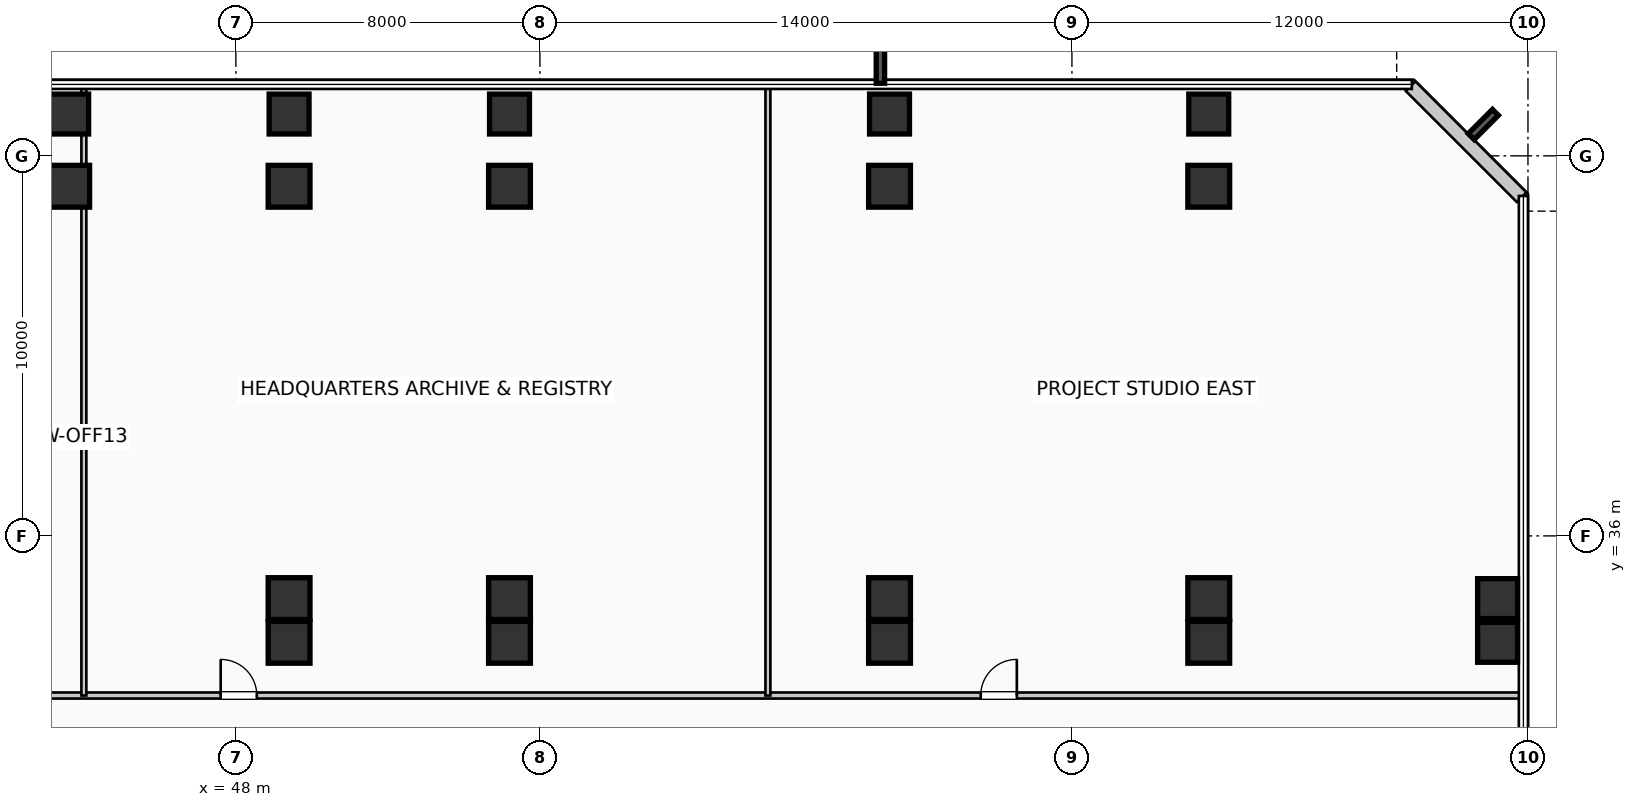
"""IFC4 building model, lengths in metres.
Left out: names, types, materials, properties, quantities, classifications, styles, units other than length and angle.
Written with IfcOpenShell. Run it as: python <this file> out.ifc"""

import sys

from ifc_helpers import new_model, si_unit, direction, frame, frame_2d, origin, origin_2d, place, context, subcontext, project, spatial, rectangle, extrude, element, fill, save


model = new_model("IFC4")
c1 = context("Model", 3, precision=1e-05, world=origin(), true_north=direction((0.0, 1.0)))
c2 = subcontext(c1, "Body", "Model", "MODEL_VIEW")
j1 = project(units=[si_unit("LENGTHUNIT", "METRE"), si_unit("PLANEANGLEUNIT", "RADIAN")], contexts=[c1])
p1 = place(None, origin())
s1 = spatial("IfcSite", under=j1, at=p1, CompositionType="ELEMENT")
p2 = place(p1, origin())
s2 = spatial("IfcBuilding", under=s1, at=p2, CompositionType="ELEMENT")
p3 = place(p2, frame((0.0, 0.0, 5.94)))
s3 = spatial("IfcBuildingStorey", under=s2, at=p3, CompositionType="ELEMENT", Elevation=5.94)
p4 = place(p3, frame((43.6, 45.2, 0.0), z_axis=(0.0, 0.0, 1.0), x_axis=(1.0, 0.0, 0.0)))
e1 = element("IfcColumn", 1, at=p4, inside=s3, PredefinedType="COLUMN", context=c2, shape_type="SweptSolid", body=[
    extrude(rectangle(XDim=1.1, YDim=1.1, at=origin_2d()), origin(), (0.0, 0.0, 1.0), 5.28),
])
p5 = place(p3, frame((43.6, 47.1, 0.0), z_axis=(0.0, 0.0, 1.0), x_axis=(1.0, 0.0, 0.0)))
e2 = element("IfcColumn", 2, at=p5, inside=s3, PredefinedType="COLUMN", context=c2, shape_type="SweptSolid", body=[
    extrude(rectangle(XDim=1.05, YDim=1.05, at=origin_2d()), origin(), (0.0, 0.0, 1.0), 5.28),
])
for number, where, z_axis, x_axis in (
    (3, (49.4, 33.2, 0.0), (0.0, 0.0, 1.0), (1.0, 0.0, 0.0)),
    (4, (49.4, 34.35, 0.0), (0.0, 0.0, 1.0), (1.0, 0.0, 0.0)),
    (5, (49.4, 45.2, 0.0), (0.0, 0.0, 1.0), (1.0, 0.0, 0.0)),
):
    element("IfcColumn", number, at=place(p3, frame(where, z_axis=z_axis, x_axis=x_axis)), inside=s3, PredefinedType="COLUMN", context=c2, shape_type="SweptSolid", body=[
        extrude(rectangle(XDim=1.1, YDim=1.1, at=origin_2d()), origin(), (0.0, 0.0, 1.0), 5.28),
    ])
p6 = place(p3, frame((49.4, 47.1, 0.0), z_axis=(0.0, 0.0, 1.0), x_axis=(1.0, 0.0, 0.0)))
e6 = element("IfcColumn", 6, at=p6, inside=s3, PredefinedType="COLUMN", context=c2, shape_type="SweptSolid", body=[
    extrude(rectangle(XDim=1.05, YDim=1.05, at=origin_2d()), origin(), (0.0, 0.0, 1.0), 5.28),
])
for number, where, z_axis, x_axis in (
    (7, (55.2, 33.2, 0.0), (0.0, 0.0, 1.0), (1.0, 0.0, 0.0)),
    (8, (55.2, 34.35, 0.0), (0.0, 0.0, 1.0), (1.0, 0.0, 0.0)),
    (9, (55.2, 45.2, 0.0), (0.0, 0.0, 1.0), (1.0, 0.0, 0.0)),
):
    element("IfcColumn", number, at=place(p3, frame(where, z_axis=z_axis, x_axis=x_axis)), inside=s3, PredefinedType="COLUMN", context=c2, shape_type="SweptSolid", body=[
        extrude(rectangle(XDim=1.1, YDim=1.1, at=origin_2d()), origin(), (0.0, 0.0, 1.0), 5.28),
    ])
p7 = place(p3, frame((55.2, 47.1, 0.0), z_axis=(0.0, 0.0, 1.0), x_axis=(1.0, 0.0, 0.0)))
e10 = element("IfcColumn", 10, at=p7, inside=s3, PredefinedType="COLUMN", context=c2, shape_type="SweptSolid", body=[
    extrude(rectangle(XDim=1.05, YDim=1.05, at=origin_2d()), origin(), (0.0, 0.0, 1.0), 5.28),
])
for number, where, z_axis, x_axis in (
    (11, (65.2, 33.2, 0.0), (0.0, 0.0, 1.0), (1.0, 0.0, 0.0)),
    (12, (65.2, 34.35, 0.0), (0.0, 0.0, 1.0), (1.0, 0.0, 0.0)),
    (13, (65.2, 45.2, 0.0), (0.0, 0.0, 1.0), (1.0, 0.0, 0.0)),
):
    element("IfcColumn", number, at=place(p3, frame(where, z_axis=z_axis, x_axis=x_axis)), inside=s3, PredefinedType="COLUMN", context=c2, shape_type="SweptSolid", body=[
        extrude(rectangle(XDim=1.1, YDim=1.1, at=origin_2d()), origin(), (0.0, 0.0, 1.0), 5.28),
    ])
p8 = place(p3, frame((65.2, 47.1, 0.0), z_axis=(0.0, 0.0, 1.0), x_axis=(1.0, 0.0, 0.0)))
e14 = element("IfcColumn", 14, at=p8, inside=s3, PredefinedType="COLUMN", context=c2, shape_type="SweptSolid", body=[
    extrude(rectangle(XDim=1.05, YDim=1.05, at=origin_2d()), origin(), (0.0, 0.0, 1.0), 5.28),
])
for number, where, z_axis, x_axis in (
    (15, (73.6, 33.2, 0.0), (0.0, 0.0, 1.0), (1.0, 0.0, 0.0)),
    (16, (73.6, 34.35, 0.0), (0.0, 0.0, 1.0), (1.0, 0.0, 0.0)),
    (17, (73.6, 45.2, 0.0), (0.0, 0.0, 1.0), (1.0, 0.0, 0.0)),
):
    element("IfcColumn", number, at=place(p3, frame(where, z_axis=z_axis, x_axis=x_axis)), inside=s3, PredefinedType="COLUMN", context=c2, shape_type="SweptSolid", body=[
        extrude(rectangle(XDim=1.1, YDim=1.1, at=origin_2d()), origin(), (0.0, 0.0, 1.0), 5.28),
    ])
for number, where, z_axis, x_axis in (
    (18, (73.6, 47.1, 0.0), (0.0, 0.0, 1.0), (1.0, 0.0, 0.0)),
    (19, (81.2, 33.2, 0.0), (0.0, 0.0, 1.0), (1.0, 0.0, 0.0)),
    (20, (81.2, 34.35, 0.0), (0.0, 0.0, 1.0), (1.0, 0.0, 0.0)),
):
    element("IfcColumn", number, at=place(p3, frame(where, z_axis=z_axis, x_axis=x_axis)), inside=s3, PredefinedType="COLUMN", context=c2, shape_type="SweptSolid", body=[
        extrude(rectangle(XDim=1.05, YDim=1.05, at=origin_2d()), origin(), (0.0, 0.0, 1.0), 5.28),
    ])
p9 = place(p3, frame((81.834, 44.912, 0.0), z_axis=(0.0, 0.0, 1.0), x_axis=(-0.707106781187, 0.707106781187, 0.0)))
e21 = element("IfcWall", 21, at=p9, inside=s3, PredefinedType="SOLIDWALL", context=c2, shape_type="SweptSolid", body=[
    extrude(rectangle(XDim=4.133, YDim=0.36, at=frame_2d((2.066, 0.0))), origin(), (0.0, 0.0, 1.0), 4.96),
])
p10 = place(p3, frame((23.6, 31.8, 0.0), z_axis=(0.0, 0.0, 1.0), x_axis=(1.0, 0.0, 0.0)))
e22 = element("IfcWall", 22, at=p10, inside=s3, PredefinedType="PARTITIONING", context=c2, shape_type="SweptSolid", body=[
    extrude(rectangle(XDim=58.21, YDim=0.16, at=frame_2d((29.105, 0.0))), origin(), (0.0, 0.0, 1.0), 4.96),
])
p11 = place(p10, frame((5.0, 0.0, 0.0)))
e23 = element("IfcOpeningElement", 23, at=p11, cuts=e22, PredefinedType="OPENING", context=c2, shape_type="SweptSolid", body=[
    extrude(rectangle(XDim=0.95, YDim=2.15, at=frame_2d((0.475, 1.075))), frame((0.0, 0.09, 0.0), z_axis=(0.0, -1.0, 0.0), x_axis=(1.0, 0.0, 0.0)), (0.0, 0.0, 1.0), 0.18),
])
p12 = place(p10, frame((24.0, 0.0, 0.0)))
e24 = element("IfcOpeningElement", 24, at=p12, cuts=e22, PredefinedType="OPENING", context=c2, shape_type="SweptSolid", body=[
    extrude(rectangle(XDim=0.95, YDim=2.15, at=frame_2d((0.475, 1.075))), frame((0.0, 0.09, 0.0), z_axis=(0.0, -1.0, 0.0), x_axis=(1.0, 0.0, 0.0)), (0.0, 0.0, 1.0), 0.18),
])
p13 = place(p10, frame((44.0, 0.0, 0.0)))
e25 = element("IfcOpeningElement", 25, at=p13, cuts=e22, PredefinedType="OPENING", context=c2, shape_type="SweptSolid", body=[
    extrude(rectangle(XDim=0.95, YDim=2.15, at=frame_2d((0.475, 1.075))), frame((0.0, 0.09, 0.0), z_axis=(0.0, -1.0, 0.0), x_axis=(1.0, 0.0, 0.0)), (0.0, 0.0, 1.0), 0.18),
])
for number, where, z_axis, x_axis in (
    (26, (44.0, 31.8, 0.0), (0.0, 0.0, 1.0), (0.0, 1.0, 0.0)),
    (27, (62.0, 31.8, 0.0), (0.0, 0.0, 1.0), (0.0, 1.0, 0.0)),
):
    element("IfcWall", number, at=place(p3, frame(where, z_axis=z_axis, x_axis=x_axis)), inside=s3, PredefinedType="PARTITIONING", context=c2, shape_type="SweptSolid", body=[
        extrude(rectangle(XDim=16.01, YDim=0.13, at=frame_2d((8.005, 0.0))), origin(), (0.0, 0.0, 1.0), 4.96),
    ])
p14 = place(p12, origin())
e28 = element("IfcDoor", 28, at=p14, inside=s3, OperationType="SINGLE_SWING_LEFT", PredefinedType="DOOR", context=c2, shape_type="SweptSolid", body=[
    extrude(rectangle(XDim=0.95, YDim=2.15, at=frame_2d((0.475, 1.075))), frame((0.0, 0.025, 0.0), z_axis=(0.0, -1.0, 0.0), x_axis=(1.0, 0.0, 0.0)), (0.0, 0.0, 1.0), 0.05),
])
fill(e24, e28)
p15 = place(p13, origin())
e29 = element("IfcDoor", 29, at=p15, inside=s3, OperationType="SINGLE_SWING_RIGHT", PredefinedType="DOOR", context=c2, shape_type="SweptSolid", body=[
    extrude(rectangle(XDim=0.95, YDim=2.15, at=frame_2d((0.475, 1.075))), frame((0.0, 0.025, 0.0), z_axis=(0.0, -1.0, 0.0), x_axis=(1.0, 0.0, 0.0)), (0.0, 0.0, 1.0), 0.05),
])
fill(e25, e29)
save(model, sys.argv[1])
